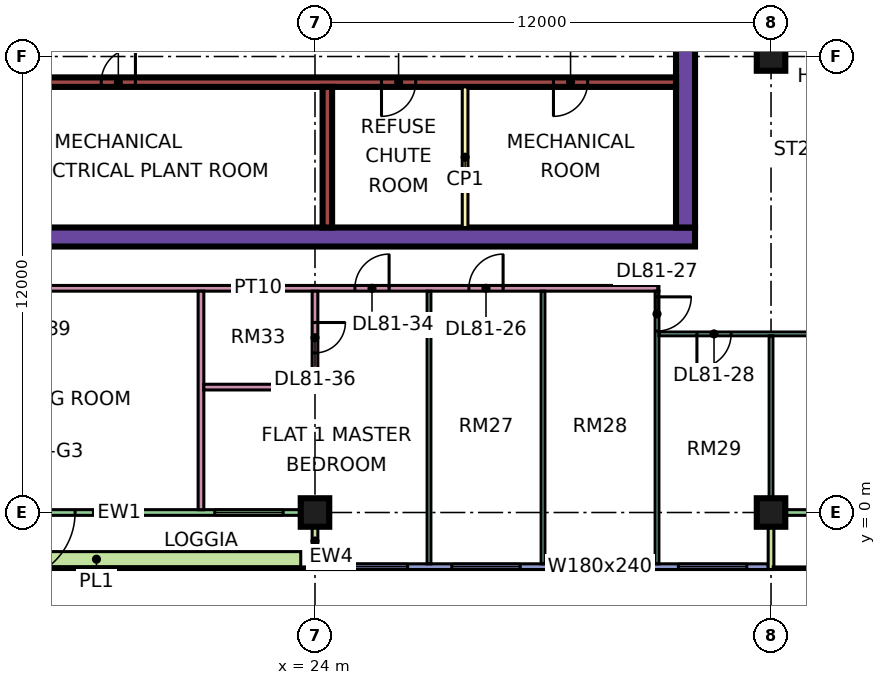
"""IFC4 building model, lengths in metres.
Left out: names, types, materials, properties, quantities, classifications, styles, units other than length and angle.
Written with IfcOpenShell. Run it as: python <this file> out.ifc"""

import sys

from ifc_helpers import new_model, si_unit, direction, frame, frame_2d, origin, origin_2d, place, context, subcontext, project, spatial, rectangle, extrude, element, fill, save


model = new_model("IFC4")
c1 = context("Model", 3, precision=1e-05, world=origin(), true_north=direction((0.0, 1.0)))
c2 = subcontext(c1, "Body", "Model", "MODEL_VIEW")
j1 = project(units=[si_unit("LENGTHUNIT", "METRE"), si_unit("PLANEANGLEUNIT", "RADIAN")], contexts=[c1])
p1 = place(None, origin())
s1 = spatial("IfcSite", under=j1, at=p1, CompositionType="ELEMENT")
p2 = place(p1, origin())
s2 = spatial("IfcBuilding", under=s1, at=p2, CompositionType="ELEMENT")
p3 = place(p2, frame((0.0, 0.0, 350.15)))
s3 = spatial("IfcBuildingStorey", under=s2, at=p3, CompositionType="ELEMENT", Elevation=350.15)
for number, where, z_axis, x_axis in (
    (1, (24.0, 0.0, 0.0), (0.0, 0.0, 1.0), (1.0, 0.0, 0.0)),
    (2, (36.0, 0.0, 0.0), (0.0, 0.0, 1.0), (1.0, 0.0, 0.0)),
    (3, (36.0, 12.0, 0.0), (0.0, 0.0, 1.0), (1.0, 0.0, 0.0)),
):
    element("IfcColumn", number, at=place(p3, frame(where, z_axis=z_axis, x_axis=x_axis)), inside=s3, PredefinedType="COLUMN", context=c2, shape_type="SweptSolid", body=[
        extrude(rectangle(XDim=0.75, YDim=0.75, at=origin_2d()), origin(), (0.0, 0.0, 1.0), 3.75),
    ])
p4 = place(p3, frame((9.0, 7.25, 0.0), z_axis=(0.0, 0.0, 1.0), x_axis=(1.0, 0.0, 0.0)))
e4 = element("IfcWall", 4, at=p4, inside=s3, PredefinedType="SHEAR", context=c2, shape_type="SweptSolid", body=[
    extrude(rectangle(XDim=25.0, YDim=0.5, at=frame_2d((12.5, 0.0))), origin(), (0.0, 0.0, 1.0), 3.75),
])
p5 = place(p3, frame((33.75, 7.5, 0.0), z_axis=(0.0, 0.0, 1.0), x_axis=(0.0, 1.0, 0.0)))
e5 = element("IfcWall", 5, at=p5, inside=s3, PredefinedType="SHEAR", context=c2, shape_type="SweptSolid", body=[
    extrude(rectangle(XDim=12.0, YDim=0.5, at=frame_2d((6.0, 0.0))), origin(), (0.0, 0.0, 1.0), 3.75),
])
p6 = place(p5, frame((5.7, 0.0, 0.0)))
e6 = element("IfcOpeningElement", 6, at=p6, cuts=e5, PredefinedType="OPENING", context=c2, shape_type="SweptSolid", body=[
    extrude(rectangle(XDim=1.8, YDim=2.4, at=frame_2d((0.9, 1.2))), frame((0.0, 0.26, 0.0), z_axis=(0.0, -1.0, 0.0), x_axis=(1.0, 0.0, 0.0)), (0.0, 0.0, 1.0), 0.52),
])
p7 = place(p3, frame((13.45, 11.325, 0.0), z_axis=(0.0, 0.0, 1.0), x_axis=(1.0, 0.0, 0.0)))
e7 = element("IfcWall", 7, at=p7, inside=s3, PredefinedType="SHEAR", context=c2, shape_type="SweptSolid", body=[
    extrude(rectangle(XDim=20.05, YDim=0.25, at=frame_2d((10.025, 0.0))), origin(), (0.0, 0.0, 1.0), 3.75),
])
p8 = place(p7, frame((4.925, 0.0, 0.0)))
e8 = element("IfcOpeningElement", 8, at=p8, cuts=e7, PredefinedType="OPENING", context=c2, shape_type="SweptSolid", body=[
    extrude(rectangle(XDim=0.9, YDim=2.1, at=frame_2d((0.45, 1.05))), frame((0.0, 0.135, 0.0), z_axis=(0.0, -1.0, 0.0), x_axis=(1.0, 0.0, 0.0)), (0.0, 0.0, 1.0), 0.27),
])
p9 = place(p7, frame((12.3, 0.0, 0.0)))
e9 = element("IfcOpeningElement", 9, at=p9, cuts=e7, PredefinedType="OPENING", context=c2, shape_type="SweptSolid", body=[
    extrude(rectangle(XDim=0.9, YDim=2.1, at=frame_2d((0.45, 1.05))), frame((0.0, 0.135, 0.0), z_axis=(0.0, -1.0, 0.0), x_axis=(1.0, 0.0, 0.0)), (0.0, 0.0, 1.0), 0.27),
])
p10 = place(p7, frame((16.825, 0.0, 0.0)))
e10 = element("IfcOpeningElement", 10, at=p10, cuts=e7, PredefinedType="OPENING", context=c2, shape_type="SweptSolid", body=[
    extrude(rectangle(XDim=0.9, YDim=2.1, at=frame_2d((0.45, 1.05))), frame((0.0, 0.135, 0.0), z_axis=(0.0, -1.0, 0.0), x_axis=(1.0, 0.0, 0.0)), (0.0, 0.0, 1.0), 0.27),
])
p11 = place(p3, frame((24.325, 7.5, 0.0), z_axis=(0.0, 0.0, 1.0), x_axis=(0.0, 1.0, 0.0)))
e11 = element("IfcWall", 11, at=p11, inside=s3, PredefinedType="SHEAR", context=c2, shape_type="SweptSolid", body=[
    extrude(rectangle(XDim=3.7, YDim=0.25, at=frame_2d((1.85, 0.0))), origin(), (0.0, 0.0, 1.0), 3.75),
])
p12 = place(p3, frame((12.575, 0.0, 0.0), z_axis=(0.0, 0.0, 1.0), x_axis=(1.0, 0.0, 0.0)))
e12 = element("IfcWall", 12, at=p12, inside=s3, PredefinedType="SOLIDWALL", context=c2, shape_type="SweptSolid", body=[
    extrude(rectangle(XDim=11.35, YDim=0.15, at=frame_2d((5.675, 0.0))), origin(), (0.0, 0.0, 1.0), 3.35),
])
p13 = place(p12, frame((3.312, 0.0, 0.0)))
e13 = element("IfcOpeningElement", 13, at=p13, cuts=e12, PredefinedType="OPENING", context=c2, shape_type="SweptSolid", body=[
    extrude(rectangle(XDim=1.8, YDim=2.4, at=frame_2d((0.9, 1.2))), frame((0.0, 0.085, 0.0), z_axis=(0.0, -1.0, 0.0), x_axis=(1.0, 0.0, 0.0)), (0.0, 0.0, 1.0), 0.17),
])
p14 = place(p12, frame((8.788, 0.0, 0.45)))
e14 = element("IfcOpeningElement", 14, at=p14, cuts=e12, PredefinedType="OPENING", context=c2, shape_type="SweptSolid", body=[
    extrude(rectangle(XDim=1.8, YDim=2.4, at=frame_2d((0.9, 1.2))), frame((0.0, 0.085, 0.0), z_axis=(0.0, -1.0, 0.0), x_axis=(1.0, 0.0, 0.0)), (0.0, 0.0, 1.0), 0.17),
])
p15 = place(p3, frame((24.0, -1.5, 0.0), z_axis=(0.0, 0.0, 1.0), x_axis=(0.0, 1.0, 0.0)))
e15 = element("IfcWall", 15, at=p15, inside=s3, PredefinedType="SOLIDWALL", context=c2, shape_type="SweptSolid", body=[
    extrude(rectangle(XDim=1.5, YDim=0.15, at=frame_2d((0.75, 0.0))), origin(), (0.0, 0.0, 1.0), 3.35),
])
p16 = place(p3, frame((24.075, -1.425, 0.0), z_axis=(0.0, 0.0, 1.0), x_axis=(1.0, 0.0, 0.0)))
e16 = element("IfcWall", 16, at=p16, inside=s3, PredefinedType="SOLIDWALL", context=c2, shape_type="SweptSolid", body=[
    extrude(rectangle(XDim=11.85, YDim=0.15, at=frame_2d((5.925, 0.0))), origin(), (0.0, 0.0, 1.0), 3.35),
])
p17 = place(p16, frame((0.562, 0.0, 0.45)))
e17 = element("IfcOpeningElement", 17, at=p17, cuts=e16, PredefinedType="OPENING", context=c2, shape_type="SweptSolid", body=[
    extrude(rectangle(XDim=1.8, YDim=2.4, at=frame_2d((0.9, 1.2))), frame((0.0, 0.085, 0.0), z_axis=(0.0, -1.0, 0.0), x_axis=(1.0, 0.0, 0.0)), (0.0, 0.0, 1.0), 0.17),
])
p18 = place(p16, frame((3.525, 0.0, 0.45)))
e18 = element("IfcOpeningElement", 18, at=p18, cuts=e16, PredefinedType="OPENING", context=c2, shape_type="SweptSolid", body=[
    extrude(rectangle(XDim=1.8, YDim=2.4, at=frame_2d((0.9, 1.2))), frame((0.0, 0.085, 0.0), z_axis=(0.0, -1.0, 0.0), x_axis=(1.0, 0.0, 0.0)), (0.0, 0.0, 1.0), 0.17),
])
p19 = place(p16, frame((6.525, 0.0, 0.45)))
e19 = element("IfcOpeningElement", 19, at=p19, cuts=e16, PredefinedType="OPENING", context=c2, shape_type="SweptSolid", body=[
    extrude(rectangle(XDim=1.8, YDim=2.4, at=frame_2d((0.9, 1.2))), frame((0.0, 0.085, 0.0), z_axis=(0.0, -1.0, 0.0), x_axis=(1.0, 0.0, 0.0)), (0.0, 0.0, 1.0), 0.17),
])
p20 = place(p16, frame((9.488, 0.0, 0.45)))
e20 = element("IfcOpeningElement", 20, at=p20, cuts=e16, PredefinedType="OPENING", context=c2, shape_type="SweptSolid", body=[
    extrude(rectangle(XDim=1.8, YDim=2.4, at=frame_2d((0.9, 1.2))), frame((0.0, 0.085, 0.0), z_axis=(0.0, -1.0, 0.0), x_axis=(1.0, 0.0, 0.0)), (0.0, 0.0, 1.0), 0.17),
])
p21 = place(p3, frame((36.075, 0.0, 0.0), z_axis=(0.0, 0.0, 1.0), x_axis=(1.0, 0.0, 0.0)))
e21 = element("IfcWall", 21, at=p21, inside=s3, PredefinedType="SOLIDWALL", context=c2, shape_type="SweptSolid", body=[
    extrude(rectangle(XDim=11.85, YDim=0.15, at=frame_2d((5.925, 0.0))), origin(), (0.0, 0.0, 1.0), 3.35),
])
p22 = place(p21, frame((3.525, 0.0, 0.0)))
e22 = element("IfcOpeningElement", 22, at=p22, cuts=e21, PredefinedType="OPENING", context=c2, shape_type="SweptSolid", body=[
    extrude(rectangle(XDim=1.8, YDim=2.4, at=frame_2d((0.9, 1.2))), frame((0.0, 0.085, 0.0), z_axis=(0.0, -1.0, 0.0), x_axis=(1.0, 0.0, 0.0)), (0.0, 0.0, 1.0), 0.17),
])
p23 = place(p21, frame((10.025, 0.0, 0.45)))
e23 = element("IfcOpeningElement", 23, at=p23, cuts=e21, PredefinedType="OPENING", context=c2, shape_type="SweptSolid", body=[
    extrude(rectangle(XDim=1.2, YDim=2.4, at=frame_2d((0.6, 1.2))), frame((0.0, 0.085, 0.0), z_axis=(0.0, -1.0, 0.0), x_axis=(1.0, 0.0, 0.0)), (0.0, 0.0, 1.0), 0.17),
])
p24 = place(p3, frame((36.0, -1.5, 0.0), z_axis=(0.0, 0.0, 1.0), x_axis=(0.0, 1.0, 0.0)))
e24 = element("IfcWall", 24, at=p24, inside=s3, PredefinedType="SOLIDWALL", context=c2, shape_type="SweptSolid", body=[
    extrude(rectangle(XDim=1.5, YDim=0.15, at=frame_2d((0.75, 0.0))), origin(), (0.0, 0.0, 1.0), 3.35),
])
p25 = place(p3, frame((12.875, -1.229, 0.0), z_axis=(0.0, 0.0, 1.0), x_axis=(1.0, 0.0, 0.0)))
e25 = element("IfcWall", 25, at=p25, inside=s3, PredefinedType="SOLIDWALL", context=c2, shape_type="SweptSolid", body=[
    extrude(rectangle(XDim=10.75, YDim=0.4, at=frame_2d((5.375, 0.0))), origin(), (0.0, 0.0, 1.0), 0.7),
])
p26 = place(p3, frame((27.95, 7.5, 0.0), z_axis=(0.0, 0.0, 1.0), x_axis=(0.0, 1.0, 0.0)))
e26 = element("IfcWall", 26, at=p26, inside=s3, PredefinedType="PARTITIONING", context=c2, shape_type="SweptSolid", body=[
    extrude(rectangle(XDim=3.7, YDim=0.15, at=frame_2d((1.85, 0.0))), origin(), (0.0, 0.0, 1.0), 3.35),
])
p27 = place(p3, frame((11.95, 5.9, 0.0), z_axis=(0.0, 0.0, 1.0), x_axis=(1.0, 0.0, 0.0)))
e27 = element("IfcWall", 27, at=p27, inside=s3, PredefinedType="PARTITIONING", context=c2, shape_type="SweptSolid", body=[
    extrude(rectangle(XDim=21.1, YDim=0.15, at=frame_2d((10.55, 0.0))), origin(), (0.0, 0.0, 1.0), 3.35),
])
p28 = place(p27, frame((16.1, 0.0, 0.0)))
e28 = element("IfcOpeningElement", 28, at=p28, cuts=e27, PredefinedType="OPENING", context=c2, shape_type="SweptSolid", body=[
    extrude(rectangle(XDim=0.9, YDim=2.1, at=frame_2d((0.45, 1.05))), frame((0.0, 0.085, 0.0), z_axis=(0.0, -1.0, 0.0), x_axis=(1.0, 0.0, 0.0)), (0.0, 0.0, 1.0), 0.17),
])
p29 = place(p27, frame((13.1, 0.0, 0.0)))
e29 = element("IfcOpeningElement", 29, at=p29, cuts=e27, PredefinedType="OPENING", context=c2, shape_type="SweptSolid", body=[
    extrude(rectangle(XDim=0.9, YDim=2.1, at=frame_2d((0.45, 1.05))), frame((0.0, 0.085, 0.0), z_axis=(0.0, -1.0, 0.0), x_axis=(1.0, 0.0, 0.0)), (0.0, 0.0, 1.0), 0.17),
])
p30 = place(p27, frame((4.1, 0.0, 0.0)))
e30 = element("IfcOpeningElement", 30, at=p30, cuts=e27, PredefinedType="OPENING", context=c2, shape_type="SweptSolid", body=[
    extrude(rectangle(XDim=0.9, YDim=2.1, at=frame_2d((0.45, 1.05))), frame((0.0, 0.085, 0.0), z_axis=(0.0, -1.0, 0.0), x_axis=(1.0, 0.0, 0.0)), (0.0, 0.0, 1.0), 0.17),
])
p31 = place(p3, frame((21.0, 0.074, 0.0), z_axis=(0.0, 0.0, 1.0), x_axis=(0.0, 1.0, 0.0)))
e31 = element("IfcWall", 31, at=p31, inside=s3, PredefinedType="PARTITIONING", context=c2, shape_type="SweptSolid", body=[
    extrude(rectangle(XDim=5.751, YDim=0.15, at=frame_2d((2.875, 0.0))), origin(), (0.0, 0.0, 1.0), 3.35),
])
p32 = place(p3, frame((21.075, 3.3, 0.0), z_axis=(0.0, 0.0, 1.0), x_axis=(1.0, 0.0, 0.0)))
e32 = element("IfcWall", 32, at=p32, inside=s3, PredefinedType="PARTITIONING", context=c2, shape_type="SweptSolid", body=[
    extrude(rectangle(XDim=3.0, YDim=0.15, at=frame_2d((1.5, 0.0))), origin(), (0.0, 0.0, 1.0), 3.35),
])
p33 = place(p3, frame((24.0, 3.375, 0.0), z_axis=(0.0, 0.0, 1.0), x_axis=(0.0, 1.0, 0.0)))
e33 = element("IfcWall", 33, at=p33, inside=s3, PredefinedType="PARTITIONING", context=c2, shape_type="SweptSolid", body=[
    extrude(rectangle(XDim=2.45, YDim=0.15, at=frame_2d((1.225, 0.0))), origin(), (0.0, 0.0, 1.0), 3.35),
])
p34 = place(p33, frame((0.825, 0.0, 0.0)))
e34 = element("IfcOpeningElement", 34, at=p34, cuts=e33, PredefinedType="OPENING", context=c2, shape_type="SweptSolid", body=[
    extrude(rectangle(XDim=0.8, YDim=2.1, at=frame_2d((0.4, 1.05))), frame((0.0, 0.085, 0.0), z_axis=(0.0, -1.0, 0.0), x_axis=(1.0, 0.0, 0.0)), (0.0, 0.0, 1.0), 0.17),
])
for number, where, z_axis, x_axis in (
    (35, (27.0, -1.351, 0.0), (0.0, 0.0, 1.0), (0.0, 1.0, 0.0)),
    (36, (30.0, -1.351, 0.0), (0.0, 0.0, 1.0), (0.0, 1.0, 0.0)),
):
    element("IfcWall", number, at=place(p3, frame(where, z_axis=z_axis, x_axis=x_axis)), inside=s3, PredefinedType="PARTITIONING", context=c2, shape_type="SweptSolid", body=[
        extrude(rectangle(XDim=7.176, YDim=0.1, at=frame_2d((3.588, 0.0))), origin(), (0.0, 0.0, 1.0), 3.35),
    ])
p35 = place(p3, frame((33.0, -1.351, 0.0), z_axis=(0.0, 0.0, 1.0), x_axis=(0.0, 1.0, 0.0)))
e37 = element("IfcWall", 37, at=p35, inside=s3, PredefinedType="PARTITIONING", context=c2, shape_type="SweptSolid", body=[
    extrude(rectangle(XDim=7.176, YDim=0.1, at=frame_2d((3.588, 0.0))), origin(), (0.0, 0.0, 1.0), 3.35),
])
p36 = place(p35, frame((6.126, 0.0, 0.0)))
e38 = element("IfcOpeningElement", 38, at=p36, cuts=e37, PredefinedType="OPENING", context=c2, shape_type="SweptSolid", body=[
    extrude(rectangle(XDim=0.9, YDim=2.1, at=frame_2d((0.45, 1.05))), frame((0.0, 0.06, 0.0), z_axis=(0.0, -1.0, 0.0), x_axis=(1.0, 0.0, 0.0)), (0.0, 0.0, 1.0), 0.12),
])
p37 = place(p3, frame((33.05, 4.7, 0.0), z_axis=(0.0, 0.0, 1.0), x_axis=(1.0, 0.0, 0.0)))
e39 = element("IfcWall", 39, at=p37, inside=s3, PredefinedType="PARTITIONING", context=c2, shape_type="SweptSolid", body=[
    extrude(rectangle(XDim=22.301, YDim=0.1, at=frame_2d((11.15, 0.0))), origin(), (0.0, 0.0, 1.0), 3.35),
])
p38 = place(p37, frame((1.0, 0.0, 0.0)))
e40 = element("IfcOpeningElement", 40, at=p38, cuts=e39, PredefinedType="OPENING", context=c2, shape_type="SweptSolid", body=[
    extrude(rectangle(XDim=0.9, YDim=2.1, at=frame_2d((0.45, 1.05))), frame((0.0, 0.06, 0.0), z_axis=(0.0, -1.0, 0.0), x_axis=(1.0, 0.0, 0.0)), (0.0, 0.0, 1.0), 0.12),
])
p39 = place(p37, frame((13.0, 0.0, 0.0)))
e41 = element("IfcOpeningElement", 41, at=p39, cuts=e39, PredefinedType="OPENING", context=c2, shape_type="SweptSolid", body=[
    extrude(rectangle(XDim=0.9, YDim=2.1, at=frame_2d((0.45, 1.05))), frame((0.0, 0.06, 0.0), z_axis=(0.0, -1.0, 0.0), x_axis=(1.0, 0.0, 0.0)), (0.0, 0.0, 1.0), 0.12),
])
p40 = place(p37, frame((16.0, 0.0, 0.0)))
e42 = element("IfcOpeningElement", 42, at=p40, cuts=e39, PredefinedType="OPENING", context=c2, shape_type="SweptSolid", body=[
    extrude(rectangle(XDim=0.9, YDim=2.1, at=frame_2d((0.45, 1.05))), frame((0.0, 0.06, 0.0), z_axis=(0.0, -1.0, 0.0), x_axis=(1.0, 0.0, 0.0)), (0.0, 0.0, 1.0), 0.12),
])
p41 = place(p37, frame((19.0, 0.0, 0.0)))
e43 = element("IfcOpeningElement", 43, at=p41, cuts=e39, PredefinedType="OPENING", context=c2, shape_type="SweptSolid", body=[
    extrude(rectangle(XDim=0.9, YDim=2.1, at=frame_2d((0.45, 1.05))), frame((0.0, 0.06, 0.0), z_axis=(0.0, -1.0, 0.0), x_axis=(1.0, 0.0, 0.0)), (0.0, 0.0, 1.0), 0.12),
])
p42 = place(p37, frame((7.0, 0.0, 0.0)))
e44 = element("IfcOpeningElement", 44, at=p42, cuts=e39, PredefinedType="OPENING", context=c2, shape_type="SweptSolid", body=[
    extrude(rectangle(XDim=0.9, YDim=2.1, at=frame_2d((0.45, 1.05))), frame((0.0, 0.06, 0.0), z_axis=(0.0, -1.0, 0.0), x_axis=(1.0, 0.0, 0.0)), (0.0, 0.0, 1.0), 0.12),
])
p43 = place(p3, frame((36.0, 0.0, 0.0), z_axis=(0.0, 0.0, 1.0), x_axis=(0.0, 1.0, 0.0)))
e45 = element("IfcWall", 45, at=p43, inside=s3, PredefinedType="PARTITIONING", context=c2, shape_type="SweptSolid", body=[
    extrude(rectangle(XDim=4.65, YDim=0.1, at=frame_2d((2.325, 0.0))), origin(), (0.0, 0.0, 1.0), 3.35),
])
p44 = place(p13, frame((1.8, 0.0, 0.0), z_axis=(0.0, 0.0, 1.0), x_axis=(-1.0, 0.0, 0.0)))
e46 = element("IfcDoor", 46, at=p44, inside=s3, OperationType="DOUBLE_DOOR_SINGLE_SWING", PredefinedType="DOOR", context=c2, shape_type="SweptSolid", body=[
    extrude(rectangle(XDim=1.8, YDim=2.4, at=frame_2d((0.9, 1.2))), frame((0.0, 0.025, 0.0), z_axis=(0.0, -1.0, 0.0), x_axis=(1.0, 0.0, 0.0)), (0.0, 0.0, 1.0), 0.05),
])
fill(e13, e46)
p45 = place(p14, origin())
e47 = element("IfcWindow", 47, at=p45, inside=s3, PartitioningType="SINGLE_PANEL", PredefinedType="WINDOW", context=c2, shape_type="SweptSolid", body=[
    extrude(rectangle(XDim=1.8, YDim=2.4, at=frame_2d((0.9, 1.2))), frame((0.0, 0.03, 0.0), z_axis=(0.0, -1.0, 0.0), x_axis=(1.0, 0.0, 0.0)), (0.0, 0.0, 1.0), 0.06),
])
fill(e14, e47)
p46 = place(p17, origin())
e48 = element("IfcWindow", 48, at=p46, inside=s3, PartitioningType="SINGLE_PANEL", PredefinedType="WINDOW", context=c2, shape_type="SweptSolid", body=[
    extrude(rectangle(XDim=1.8, YDim=2.4, at=frame_2d((0.9, 1.2))), frame((0.0, 0.03, 0.0), z_axis=(0.0, -1.0, 0.0), x_axis=(1.0, 0.0, 0.0)), (0.0, 0.0, 1.0), 0.06),
])
fill(e17, e48)
p47 = place(p18, origin())
e49 = element("IfcWindow", 49, at=p47, inside=s3, PartitioningType="SINGLE_PANEL", PredefinedType="WINDOW", context=c2, shape_type="SweptSolid", body=[
    extrude(rectangle(XDim=1.8, YDim=2.4, at=frame_2d((0.9, 1.2))), frame((0.0, 0.03, 0.0), z_axis=(0.0, -1.0, 0.0), x_axis=(1.0, 0.0, 0.0)), (0.0, 0.0, 1.0), 0.06),
])
fill(e18, e49)
p48 = place(p19, origin())
e50 = element("IfcWindow", 50, at=p48, inside=s3, PartitioningType="SINGLE_PANEL", PredefinedType="WINDOW", context=c2, shape_type="SweptSolid", body=[
    extrude(rectangle(XDim=1.8, YDim=2.4, at=frame_2d((0.9, 1.2))), frame((0.0, 0.03, 0.0), z_axis=(0.0, -1.0, 0.0), x_axis=(1.0, 0.0, 0.0)), (0.0, 0.0, 1.0), 0.06),
])
fill(e19, e50)
p49 = place(p20, origin())
e51 = element("IfcWindow", 51, at=p49, inside=s3, PartitioningType="SINGLE_PANEL", PredefinedType="WINDOW", context=c2, shape_type="SweptSolid", body=[
    extrude(rectangle(XDim=1.8, YDim=2.4, at=frame_2d((0.9, 1.2))), frame((0.0, 0.03, 0.0), z_axis=(0.0, -1.0, 0.0), x_axis=(1.0, 0.0, 0.0)), (0.0, 0.0, 1.0), 0.06),
])
fill(e20, e51)
p50 = place(p8, frame((0.9, 0.0, 0.0), z_axis=(0.0, 0.0, 1.0), x_axis=(-1.0, 0.0, 0.0)))
e52 = element("IfcDoor", 52, at=p50, inside=s3, OperationType="SINGLE_SWING_RIGHT", PredefinedType="DOOR", context=c2, shape_type="SweptSolid", body=[
    extrude(rectangle(XDim=0.9, YDim=2.1, at=frame_2d((0.45, 1.05))), frame((0.0, 0.025, 0.0), z_axis=(0.0, -1.0, 0.0), x_axis=(1.0, 0.0, 0.0)), (0.0, 0.0, 1.0), 0.05),
])
fill(e8, e52)
p51 = place(p9, frame((0.9, 0.0, 0.0), z_axis=(0.0, 0.0, 1.0), x_axis=(-1.0, 0.0, 0.0)))
e53 = element("IfcDoor", 53, at=p51, inside=s3, OperationType="SINGLE_SWING_LEFT", PredefinedType="DOOR", context=c2, shape_type="SweptSolid", body=[
    extrude(rectangle(XDim=0.9, YDim=2.1, at=frame_2d((0.45, 1.05))), frame((0.0, 0.025, 0.0), z_axis=(0.0, -1.0, 0.0), x_axis=(1.0, 0.0, 0.0)), (0.0, 0.0, 1.0), 0.05),
])
fill(e9, e53)
p52 = place(p10, frame((0.9, 0.0, 0.0), z_axis=(0.0, 0.0, 1.0), x_axis=(-1.0, 0.0, 0.0)))
e54 = element("IfcDoor", 54, at=p52, inside=s3, OperationType="SINGLE_SWING_LEFT", PredefinedType="DOOR", context=c2, shape_type="SweptSolid", body=[
    extrude(rectangle(XDim=0.9, YDim=2.1, at=frame_2d((0.45, 1.05))), frame((0.0, 0.025, 0.0), z_axis=(0.0, -1.0, 0.0), x_axis=(1.0, 0.0, 0.0)), (0.0, 0.0, 1.0), 0.05),
])
fill(e10, e54)
p53 = place(p28, frame((0.9, 0.0, 0.0), z_axis=(0.0, 0.0, 1.0), x_axis=(-1.0, 0.0, 0.0)))
e55 = element("IfcDoor", 55, at=p53, inside=s3, OperationType="SINGLE_SWING_RIGHT", PredefinedType="DOOR", context=c2, shape_type="SweptSolid", body=[
    extrude(rectangle(XDim=0.9, YDim=2.1, at=frame_2d((0.45, 1.05))), frame((0.0, 0.025, 0.0), z_axis=(0.0, -1.0, 0.0), x_axis=(1.0, 0.0, 0.0)), (0.0, 0.0, 1.0), 0.05),
])
fill(e28, e55)
p54 = place(p36, origin())
e56 = element("IfcDoor", 56, at=p54, inside=s3, OperationType="SINGLE_SWING_RIGHT", PredefinedType="DOOR", context=c2, shape_type="SweptSolid", body=[
    extrude(rectangle(XDim=0.9, YDim=2.1, at=frame_2d((0.45, 1.05))), frame((0.0, 0.025, 0.0), z_axis=(0.0, -1.0, 0.0), x_axis=(1.0, 0.0, 0.0)), (0.0, 0.0, 1.0), 0.05),
])
fill(e38, e56)
p55 = place(p38, frame((0.9, 0.0, 0.0), z_axis=(0.0, 0.0, 1.0), x_axis=(-1.0, 0.0, 0.0)))
e57 = element("IfcDoor", 57, at=p55, inside=s3, OperationType="SINGLE_SWING_LEFT", PredefinedType="DOOR", context=c2, shape_type="SweptSolid", body=[
    extrude(rectangle(XDim=0.9, YDim=2.1, at=frame_2d((0.45, 1.05))), frame((0.0, 0.025, 0.0), z_axis=(0.0, -1.0, 0.0), x_axis=(1.0, 0.0, 0.0)), (0.0, 0.0, 1.0), 0.05),
])
fill(e40, e57)
p56 = place(p29, frame((0.9, 0.0, 0.0), z_axis=(0.0, 0.0, 1.0), x_axis=(-1.0, 0.0, 0.0)))
e58 = element("IfcDoor", 58, at=p56, inside=s3, OperationType="SINGLE_SWING_RIGHT", PredefinedType="DOOR", context=c2, shape_type="SweptSolid", body=[
    extrude(rectangle(XDim=0.9, YDim=2.1, at=frame_2d((0.45, 1.05))), frame((0.0, 0.025, 0.0), z_axis=(0.0, -1.0, 0.0), x_axis=(1.0, 0.0, 0.0)), (0.0, 0.0, 1.0), 0.05),
])
fill(e29, e58)
p57 = place(p34, origin())
e59 = element("IfcDoor", 59, at=p57, inside=s3, OperationType="SINGLE_SWING_RIGHT", PredefinedType="DOOR", context=c2, shape_type="SweptSolid", body=[
    extrude(rectangle(XDim=0.8, YDim=2.1, at=frame_2d((0.4, 1.05))), frame((0.0, 0.025, 0.0), z_axis=(0.0, -1.0, 0.0), x_axis=(1.0, 0.0, 0.0)), (0.0, 0.0, 1.0), 0.05),
])
fill(e34, e59)
save(model, sys.argv[1])
